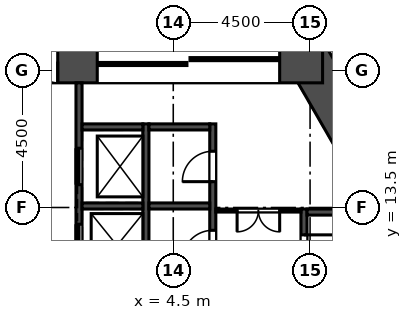
"""IFC4 building model, lengths in metres.
Left out: names, types, materials, properties, quantities, classifications, styles, units other than length and angle.
Written with IfcOpenShell. Run it as: python <this file> out.ifc"""

import sys

from ifc_helpers import new_model, si_unit, direction, frame, frame_2d, origin, place, context, subcontext, project, spatial, rectangle, extrude, element, fill, save


model = new_model("IFC4")
c1 = context("Model", 3, precision=1e-05, world=origin(), true_north=direction((0.0, 1.0)))
c2 = subcontext(c1, "Body", "Model", "MODEL_VIEW")
j1 = project(units=[si_unit("LENGTHUNIT", "METRE"), si_unit("PLANEANGLEUNIT", "RADIAN")], contexts=[c1])
p1 = place(None, origin())
s1 = spatial("IfcSite", under=j1, at=p1, CompositionType="ELEMENT")
p2 = place(p1, origin())
s2 = spatial("IfcBuilding", under=s1, at=p2, CompositionType="ELEMENT")
p3 = place(p2, origin())
s3 = spatial("IfcBuildingStorey", under=s2, at=p3, CompositionType="ELEMENT", Elevation=0.0)
p4 = place(p3, frame((13.394, 10.703, 0.0), z_axis=(0.0, 0.0, 1.0), x_axis=(-0.50000187635, 0.866024320471, 0.0)))
e1 = element("IfcWall", 1, at=p4, inside=s3, PredefinedType="SHEAR", context=c2, shape_type="SweptSolid", body=[
    extrude(rectangle(XDim=9.177, YDim=1.4, at=frame_2d((4.588, 0.0))), origin(), (0.0, 0.0, 1.0), 8.0),
])
p5 = place(p3, frame((9.412, 18.3, 0.0), z_axis=(0.0, 0.0, 1.0), x_axis=(-1.0, 0.0, 0.0)))
e2 = element("IfcWall", 2, at=p5, inside=s3, PredefinedType="SHEAR", context=c2, shape_type="SweptSolid", body=[
    extrude(rectangle(XDim=18.823, YDim=1.4, at=frame_2d((9.412, 0.0))), origin(), (0.0, 0.0, 1.0), 8.0),
])
p6 = place(p5, frame((8.711, 0.0, 0.0)))
e3 = element("IfcOpeningElement", 3, at=p6, cuts=e2, PredefinedType="OPENING", context=c2, shape_type="SweptSolid", body=[
    extrude(rectangle(XDim=1.4, YDim=2.1, at=frame_2d((0.7, 1.05))), frame((0.0, 0.71, 0.0), z_axis=(0.0, -1.0, 0.0), x_axis=(1.0, 0.0, 0.0)), (0.0, 0.0, 1.0), 1.42),
])
p7 = place(p5, frame((11.412, 0.0, 0.0)))
e4 = element("IfcOpeningElement", 4, at=p7, cuts=e2, PredefinedType="OPENING", context=c2, shape_type="SweptSolid", body=[
    extrude(rectangle(XDim=6.0, YDim=2.4, at=frame_2d((3.0, 1.2))), frame((0.0, 0.71, 0.0), z_axis=(0.0, -1.0, 0.0), x_axis=(1.0, 0.0, 0.0)), (0.0, 0.0, 1.0), 1.42),
])
p8 = place(p5, frame((1.412, 0.0, 0.0)))
e5 = element("IfcOpeningElement", 5, at=p8, cuts=e2, PredefinedType="OPENING", context=c2, shape_type="SweptSolid", body=[
    extrude(rectangle(XDim=6.0, YDim=2.4, at=frame_2d((3.0, 1.2))), frame((0.0, 0.71, 0.0), z_axis=(0.0, -1.0, 0.0), x_axis=(1.0, 0.0, 0.0)), (0.0, 0.0, 1.0), 1.42),
])
p9 = place(p3, frame((8.8, 8.25, -0.4), z_axis=(0.0, 0.0, 1.0), x_axis=(0.0, 1.0, 0.0)))
e6 = element("IfcWall", 6, at=p9, inside=s3, PredefinedType="SOLIDWALL", context=c2, shape_type="SweptSolid", body=[
    extrude(rectangle(XDim=5.2, YDim=0.2, at=frame_2d((2.6, 0.0))), origin(), (0.0, 0.0, 1.0), 8.1),
])
p10 = place(p9, frame((0.85, 0.0, 0.4)))
e7 = element("IfcOpeningElement", 7, at=p10, cuts=e6, PredefinedType="OPENING", context=c2, shape_type="SweptSolid", body=[
    extrude(rectangle(XDim=1.0, YDim=2.1, at=frame_2d((0.5, 1.05))), frame((0.0, 0.11, 0.0), z_axis=(0.0, -1.0, 0.0), x_axis=(1.0, 0.0, 0.0)), (0.0, 0.0, 1.0), 0.22),
])
p11 = place(p9, frame((3.35, 0.0, 0.4)))
e8 = element("IfcOpeningElement", 8, at=p11, cuts=e6, PredefinedType="OPENING", context=c2, shape_type="SweptSolid", body=[
    extrude(rectangle(XDim=1.0, YDim=2.1, at=frame_2d((0.5, 1.05))), frame((0.0, 0.11, 0.0), z_axis=(0.0, -1.0, 0.0), x_axis=(1.0, 0.0, 0.0)), (0.0, 0.0, 1.0), 0.22),
])
p12 = place(p3, frame((5.8, 8.25, -0.4), z_axis=(0.0, 0.0, 1.0), x_axis=(0.0, 1.0, 0.0)))
e9 = element("IfcWall", 9, at=p12, inside=s3, PredefinedType="SOLIDWALL", context=c2, shape_type="SweptSolid", body=[
    extrude(rectangle(XDim=8.0, YDim=0.2, at=frame_2d((4.0, 0.0))), origin(), (0.0, 0.0, 1.0), 8.1),
])
p13 = place(p12, frame((0.9, 0.0, 0.4)))
e10 = element("IfcOpeningElement", 10, at=p13, cuts=e9, PredefinedType="OPENING", context=c2, shape_type="SweptSolid", body=[
    extrude(rectangle(XDim=1.0, YDim=2.1, at=frame_2d((0.5, 1.05))), frame((0.0, 0.11, 0.0), z_axis=(0.0, -1.0, 0.0), x_axis=(1.0, 0.0, 0.0)), (0.0, 0.0, 1.0), 0.22),
])
p14 = place(p12, frame((3.5, 0.0, 0.4)))
e11 = element("IfcOpeningElement", 11, at=p14, cuts=e9, PredefinedType="OPENING", context=c2, shape_type="SweptSolid", body=[
    extrude(rectangle(XDim=1.0, YDim=2.1, at=frame_2d((0.5, 1.05))), frame((0.0, 0.11, 0.0), z_axis=(0.0, -1.0, 0.0), x_axis=(1.0, 0.0, 0.0)), (0.0, 0.0, 1.0), 0.22),
])
p15 = place(p12, frame((6.1, 0.0, 0.4)))
e12 = element("IfcOpeningElement", 12, at=p15, cuts=e9, PredefinedType="OPENING", context=c2, shape_type="SweptSolid", body=[
    extrude(rectangle(XDim=1.0, YDim=2.1, at=frame_2d((0.5, 1.05))), frame((0.0, 0.11, 0.0), z_axis=(0.0, -1.0, 0.0), x_axis=(1.0, 0.0, 0.0)), (0.0, 0.0, 1.0), 0.22),
])
p16 = place(p3, frame((3.6, 8.45, -0.4), z_axis=(0.0, 0.0, 1.0), x_axis=(0.0, 1.0, 0.0)))
e13 = element("IfcWall", 13, at=p16, inside=s3, PredefinedType="SOLIDWALL", context=c2, shape_type="SweptSolid", body=[
    extrude(rectangle(XDim=7.8, YDim=0.2, at=frame_2d((3.9, 0.0))), origin(), (0.0, 0.0, 1.0), 8.1),
])
p17 = place(p3, frame((1.4, 5.85, -0.4), z_axis=(0.0, 0.0, 1.0), x_axis=(0.0, 1.0, 0.0)))
e14 = element("IfcWall", 14, at=p17, inside=s3, PredefinedType="SOLIDWALL", context=c2, shape_type="SweptSolid", body=[
    extrude(rectangle(XDim=11.75, YDim=0.2, at=frame_2d((5.875, 0.0))), origin(), (0.0, 0.0, 1.0), 8.1),
])
p18 = place(p17, frame((5.7, 0.0, 0.4)))
e15 = element("IfcOpeningElement", 15, at=p18, cuts=e14, PredefinedType="OPENING", context=c2, shape_type="SweptSolid", body=[
    extrude(rectangle(XDim=1.4, YDim=2.1, at=frame_2d((0.7, 1.05))), frame((0.0, 0.11, 0.0), z_axis=(0.0, -1.0, 0.0), x_axis=(1.0, 0.0, 0.0)), (0.0, 0.0, 1.0), 0.22),
])
p19 = place(p17, frame((8.4, 0.0, 0.4)))
e16 = element("IfcOpeningElement", 16, at=p19, cuts=e14, PredefinedType="OPENING", context=c2, shape_type="SweptSolid", body=[
    extrude(rectangle(XDim=1.2, YDim=2.1, at=frame_2d((0.6, 1.05))), frame((0.0, 0.11, 0.0), z_axis=(0.0, -1.0, 0.0), x_axis=(1.0, 0.0, 0.0)), (0.0, 0.0, 1.0), 0.22),
])
p20 = place(p17, frame((0.65, 0.0, 0.4)))
e17 = element("IfcOpeningElement", 17, at=p20, cuts=e14, PredefinedType="OPENING", context=c2, shape_type="SweptSolid", body=[
    extrude(rectangle(XDim=1.1, YDim=2.1, at=frame_2d((0.55, 1.05))), frame((0.0, 0.11, 0.0), z_axis=(0.0, -1.0, 0.0), x_axis=(1.0, 0.0, 0.0)), (0.0, 0.0, 1.0), 0.22),
])
p21 = place(p17, frame((3.3, 0.0, 0.4)))
e18 = element("IfcOpeningElement", 18, at=p21, cuts=e14, PredefinedType="OPENING", context=c2, shape_type="SweptSolid", body=[
    extrude(rectangle(XDim=1.0, YDim=2.1, at=frame_2d((0.5, 1.05))), frame((0.0, 0.11, 0.0), z_axis=(0.0, -1.0, 0.0), x_axis=(1.0, 0.0, 0.0)), (0.0, 0.0, 1.0), 0.22),
])
for number, where, z_axis, x_axis in (
    (19, (8.9, 13.35, -0.4), (0.0, 0.0, 1.0), (1.0, 0.0, 0.0)),
    (20, (3.7, 13.55, -0.4), (0.0, 0.0, 1.0), (1.0, 0.0, 0.0)),
    (21, (3.7, 16.15, -0.4), (0.0, 0.0, 1.0), (1.0, 0.0, 0.0)),
    (22, (1.5, 13.55, -0.4), (0.0, 0.0, 1.0), (1.0, 0.0, 0.0)),
    (23, (1.5, 16.15, -0.4), (0.0, 0.0, 1.0), (1.0, 0.0, 0.0)),
):
    element("IfcWall", number, at=place(p3, frame(where, z_axis=z_axis, x_axis=x_axis)), inside=s3, PredefinedType="SOLIDWALL", context=c2, shape_type="SweptSolid", body=[
        extrude(rectangle(XDim=2.0, YDim=0.2, at=frame_2d((1.0, 0.0))), origin(), (0.0, 0.0, 1.0), 8.1),
    ])
p22 = place(p3, frame((5.9, 13.4, 0.0), z_axis=(0.0, 0.0, 1.0), x_axis=(1.0, 0.0, 0.0)))
e24 = element("IfcWall", 24, at=p22, inside=s3, PredefinedType="PARTITIONING", context=c2, shape_type="SweptSolid", body=[
    extrude(rectangle(XDim=2.8, YDim=0.1, at=frame_2d((1.4, 0.0))), origin(), (0.0, 0.0, 1.0), 7.7),
])
p23 = place(p22, frame((0.7, 0.0, 0.0)))
e25 = element("IfcOpeningElement", 25, at=p23, cuts=e24, PredefinedType="OPENING", context=c2, shape_type="SweptSolid", body=[
    extrude(rectangle(XDim=1.4, YDim=2.1, at=frame_2d((0.7, 1.05))), frame((0.0, 0.06, 0.0), z_axis=(0.0, -1.0, 0.0), x_axis=(1.0, 0.0, 0.0)), (0.0, 0.0, 1.0), 0.12),
])
p24 = place(p18, origin())
e26 = element("IfcDoor", 26, at=p24, inside=s3, OperationType="SLIDING_TO_LEFT", PredefinedType="DOOR", context=c2, shape_type="SweptSolid", body=[
    extrude(rectangle(XDim=1.4, YDim=2.1, at=frame_2d((0.7, 1.05))), frame((0.0, 0.025, 0.0), z_axis=(0.0, -1.0, 0.0), x_axis=(1.0, 0.0, 0.0)), (0.0, 0.0, 1.0), 0.05),
])
fill(e15, e26)
p25 = place(p19, origin())
e27 = element("IfcDoor", 27, at=p25, inside=s3, OperationType="SLIDING_TO_LEFT", PredefinedType="DOOR", context=c2, shape_type="SweptSolid", body=[
    extrude(rectangle(XDim=1.2, YDim=2.1, at=frame_2d((0.6, 1.05))), frame((0.0, 0.025, 0.0), z_axis=(0.0, -1.0, 0.0), x_axis=(1.0, 0.0, 0.0)), (0.0, 0.0, 1.0), 0.05),
])
fill(e16, e27)
p26 = place(p11, frame((1.0, 0.0, 0.0), z_axis=(0.0, 0.0, 1.0), x_axis=(-1.0, 0.0, 0.0)))
e28 = element("IfcDoor", 28, at=p26, inside=s3, OperationType="SINGLE_SWING_LEFT", PredefinedType="DOOR", context=c2, shape_type="SweptSolid", body=[
    extrude(rectangle(XDim=1.0, YDim=2.1, at=frame_2d((0.5, 1.05))), frame((0.0, 0.025, 0.0), z_axis=(0.0, -1.0, 0.0), x_axis=(1.0, 0.0, 0.0)), (0.0, 0.0, 1.0), 0.05),
])
fill(e8, e28)
p27 = place(p14, origin())
e29 = element("IfcDoor", 29, at=p27, inside=s3, OperationType="SINGLE_SWING_LEFT", PredefinedType="DOOR", context=c2, shape_type="SweptSolid", body=[
    extrude(rectangle(XDim=1.0, YDim=2.1, at=frame_2d((0.5, 1.05))), frame((0.0, 0.025, 0.0), z_axis=(0.0, -1.0, 0.0), x_axis=(1.0, 0.0, 0.0)), (0.0, 0.0, 1.0), 0.05),
])
fill(e11, e29)
p28 = place(p15, origin())
e30 = element("IfcDoor", 30, at=p28, inside=s3, OperationType="SINGLE_SWING_LEFT", PredefinedType="DOOR", context=c2, shape_type="SweptSolid", body=[
    extrude(rectangle(XDim=1.0, YDim=2.1, at=frame_2d((0.5, 1.05))), frame((0.0, 0.025, 0.0), z_axis=(0.0, -1.0, 0.0), x_axis=(1.0, 0.0, 0.0)), (0.0, 0.0, 1.0), 0.05),
])
fill(e12, e30)
p29 = place(p23, frame((1.4, 0.0, 0.0), z_axis=(0.0, 0.0, 1.0), x_axis=(-1.0, 0.0, 0.0)))
e31 = element("IfcDoor", 31, at=p29, inside=s3, OperationType="DOUBLE_DOOR_SINGLE_SWING", PredefinedType="DOOR", context=c2, shape_type="SweptSolid", body=[
    extrude(rectangle(XDim=1.4, YDim=2.1, at=frame_2d((0.7, 1.05))), frame((0.0, 0.025, 0.0), z_axis=(0.0, -1.0, 0.0), x_axis=(1.0, 0.0, 0.0)), (0.0, 0.0, 1.0), 0.05),
])
fill(e25, e31)
p30 = place(p6, origin())
e32 = element("IfcDoor", 32, at=p30, inside=s3, OperationType="DOUBLE_DOOR_SINGLE_SWING", PredefinedType="DOOR", context=c2, shape_type="SweptSolid", body=[
    extrude(rectangle(XDim=1.4, YDim=2.1, at=frame_2d((0.7, 1.05))), frame((0.0, 0.025, 0.0), z_axis=(0.0, -1.0, 0.0), x_axis=(1.0, 0.0, 0.0)), (0.0, 0.0, 1.0), 0.05),
])
fill(e3, e32)
p31 = place(p8, origin())
e33 = element("IfcDoor", 33, at=p31, inside=s3, OperationType="DOUBLE_DOOR_SLIDING", PredefinedType="DOOR", context=c2, shape_type="SweptSolid", body=[
    extrude(rectangle(XDim=6.0, YDim=2.4, at=frame_2d((3.0, 1.2))), frame((0.0, 0.025, 0.0), z_axis=(0.0, -1.0, 0.0), x_axis=(1.0, 0.0, 0.0)), (0.0, 0.0, 1.0), 0.05),
])
fill(e5, e33)
save(model, sys.argv[1])
